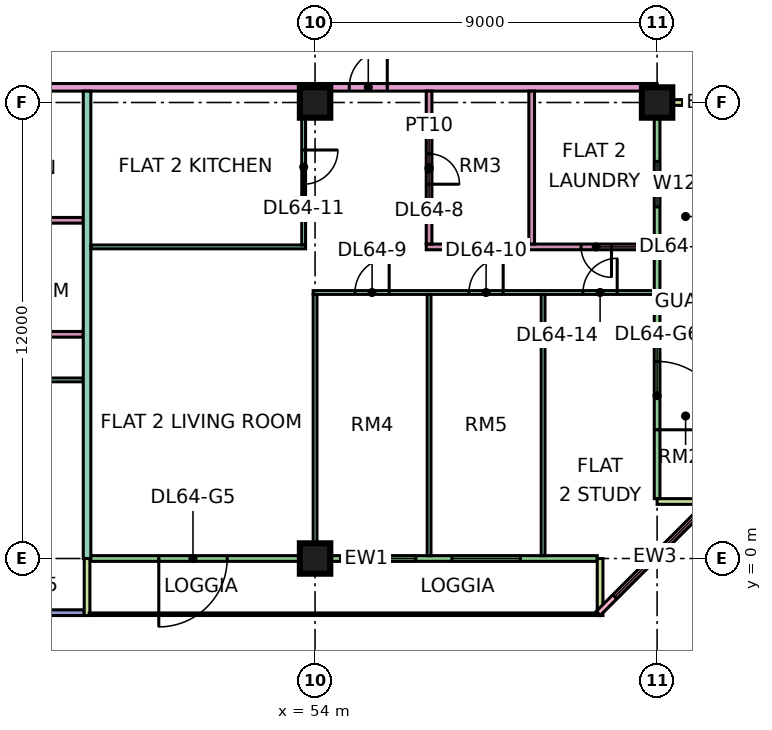
"""IFC4 building model, lengths in metres.
Left out: names, types, materials, properties, quantities, classifications, styles, units other than length and angle.
Written with IfcOpenShell. Run it as: python <this file> out.ifc"""

import sys

from ifc_helpers import new_model, si_unit, direction, frame, frame_2d, origin, origin_2d, place, context, subcontext, project, spatial, rectangle, extrude, element, fill, save


model = new_model("IFC4")
c1 = context("Model", 3, precision=1e-05, world=origin(), true_north=direction((0.0, 1.0)))
c2 = subcontext(c1, "Body", "Model", "MODEL_VIEW")
j1 = project(units=[si_unit("LENGTHUNIT", "METRE"), si_unit("PLANEANGLEUNIT", "RADIAN")], contexts=[c1])
p1 = place(None, origin())
s1 = spatial("IfcSite", under=j1, at=p1, CompositionType="ELEMENT")
p2 = place(p1, origin())
s2 = spatial("IfcBuilding", under=s1, at=p2, CompositionType="ELEMENT")
p3 = place(p2, frame((0.0, 0.0, 277.15)))
s3 = spatial("IfcBuildingStorey", under=s2, at=p3, CompositionType="ELEMENT", Elevation=277.15)
for number, where, z_axis, x_axis in (
    (1, (54.0, 0.0, 0.0), (0.0, 0.0, 1.0), (1.0, 0.0, 0.0)),
    (2, (54.0, 12.0, 0.0), (0.0, 0.0, 1.0), (1.0, 0.0, 0.0)),
    (3, (63.0, 12.0, 0.0), (0.0, 0.0, 1.0), (1.0, 0.0, 0.0)),
):
    element("IfcColumn", number, at=place(p3, frame(where, z_axis=z_axis, x_axis=x_axis)), inside=s3, PredefinedType="COLUMN", context=c2, shape_type="SweptSolid", body=[
        extrude(rectangle(XDim=0.8, YDim=0.8, at=origin_2d()), origin(), (0.0, 0.0, 1.0), 3.75),
    ])
p4 = place(p3, frame((36.075, -1.425, 0.0), z_axis=(0.0, 0.0, 1.0), x_axis=(1.0, 0.0, 0.0)))
e4 = element("IfcWall", 4, at=p4, inside=s3, PredefinedType="SOLIDWALL", context=c2, shape_type="SweptSolid", body=[
    extrude(rectangle(XDim=11.85, YDim=0.15, at=frame_2d((5.925, 0.0))), origin(), (0.0, 0.0, 1.0), 3.35),
])
p5 = place(p4, frame((0.562, 0.0, 0.45)))
e5 = element("IfcOpeningElement", 5, at=p5, cuts=e4, PredefinedType="OPENING", context=c2, shape_type="SweptSolid", body=[
    extrude(rectangle(XDim=1.8, YDim=2.4, at=frame_2d((0.9, 1.2))), frame((0.0, 0.085, 0.0), z_axis=(0.0, -1.0, 0.0), x_axis=(1.0, 0.0, 0.0)), (0.0, 0.0, 1.0), 0.17),
])
p6 = place(p4, frame((5.887, 0.0, 0.45)))
e6 = element("IfcOpeningElement", 6, at=p6, cuts=e4, PredefinedType="OPENING", context=c2, shape_type="SweptSolid", body=[
    extrude(rectangle(XDim=3.0, YDim=2.4, at=frame_2d((1.5, 1.2))), frame((0.0, 0.085, 0.0), z_axis=(0.0, -1.0, 0.0), x_axis=(1.0, 0.0, 0.0)), (0.0, 0.0, 1.0), 0.17),
])
p7 = place(p3, frame((48.075, 0.0, 0.0), z_axis=(0.0, 0.0, 1.0), x_axis=(1.0, 0.0, 0.0)))
e7 = element("IfcWall", 7, at=p7, inside=s3, PredefinedType="SOLIDWALL", context=c2, shape_type="SweptSolid", body=[
    extrude(rectangle(XDim=13.35, YDim=0.15, at=frame_2d((6.675, 0.0))), origin(), (0.0, 0.0, 1.0), 3.35),
])
p8 = place(p7, frame((1.812, 0.0, 0.0)))
e8 = element("IfcOpeningElement", 8, at=p8, cuts=e7, PredefinedType="OPENING", context=c2, shape_type="SweptSolid", body=[
    extrude(rectangle(XDim=1.8, YDim=2.4, at=frame_2d((0.9, 1.2))), frame((0.0, 0.085, 0.0), z_axis=(0.0, -1.0, 0.0), x_axis=(1.0, 0.0, 0.0)), (0.0, 0.0, 1.0), 0.17),
])
p9 = place(p7, frame((6.775, 0.0, 0.45)))
e9 = element("IfcOpeningElement", 9, at=p9, cuts=e7, PredefinedType="OPENING", context=c2, shape_type="SweptSolid", body=[
    extrude(rectangle(XDim=1.8, YDim=2.4, at=frame_2d((0.9, 1.2))), frame((0.0, 0.085, 0.0), z_axis=(0.0, -1.0, 0.0), x_axis=(1.0, 0.0, 0.0)), (0.0, 0.0, 1.0), 0.17),
])
p10 = place(p7, frame((9.525, 0.0, 0.45)))
e10 = element("IfcOpeningElement", 10, at=p10, cuts=e7, PredefinedType="OPENING", context=c2, shape_type="SweptSolid", body=[
    extrude(rectangle(XDim=1.8, YDim=2.4, at=frame_2d((0.9, 1.2))), frame((0.0, 0.085, 0.0), z_axis=(0.0, -1.0, 0.0), x_axis=(1.0, 0.0, 0.0)), (0.0, 0.0, 1.0), 0.17),
])
for number, where, z_axis, x_axis in (
    (11, (48.0, -1.5, 0.0), (0.0, 0.0, 1.0), (0.0, 1.0, 0.0)),
    (12, (61.5, -1.5, 0.0), (0.0, 0.0, 1.0), (0.0, 1.0, 0.0)),
):
    element("IfcWall", number, at=place(p3, frame(where, z_axis=z_axis, x_axis=x_axis)), inside=s3, PredefinedType="SOLIDWALL", context=c2, shape_type="SweptSolid", body=[
        extrude(rectangle(XDim=1.5, YDim=0.15, at=frame_2d((0.75, 0.0))), origin(), (0.0, 0.0, 1.0), 3.35),
    ])
p11 = place(p3, frame((61.447, -1.447, 0.0), z_axis=(0.0, 0.0, 1.0), x_axis=(0.707106781187, 0.707106781187, 0.0)))
e13 = element("IfcWall", 13, at=p11, inside=s3, PredefinedType="SOLIDWALL", context=c2, shape_type="SweptSolid", body=[
    extrude(rectangle(XDim=4.243, YDim=0.15, at=frame_2d((2.121, 0.0))), origin(), (0.0, 0.0, 1.0), 3.35),
])
p12 = place(p11, frame((0.621, 0.0, 0.45)))
e14 = element("IfcOpeningElement", 14, at=p12, cuts=e13, PredefinedType="OPENING", context=c2, shape_type="SweptSolid", body=[
    extrude(rectangle(XDim=3.0, YDim=2.4, at=frame_2d((1.5, 1.2))), frame((0.0, 0.085, 0.0), z_axis=(0.0, -1.0, 0.0), x_axis=(1.0, 0.0, 0.0)), (0.0, 0.0, 1.0), 0.17),
])
p13 = place(p3, frame((63.0, 1.575, 0.0), z_axis=(0.0, 0.0, 1.0), x_axis=(0.0, 1.0, 0.0)))
e15 = element("IfcWall", 15, at=p13, inside=s3, PredefinedType="SOLIDWALL", context=c2, shape_type="SweptSolid", body=[
    extrude(rectangle(XDim=10.35, YDim=0.15, at=frame_2d((5.175, 0.0))), origin(), (0.0, 0.0, 1.0), 3.35),
])
p14 = place(p13, frame((1.812, 0.0, 0.0)))
e16 = element("IfcOpeningElement", 16, at=p14, cuts=e15, PredefinedType="OPENING", context=c2, shape_type="SweptSolid", body=[
    extrude(rectangle(XDim=1.8, YDim=2.4, at=frame_2d((0.9, 1.2))), frame((0.0, 0.085, 0.0), z_axis=(0.0, -1.0, 0.0), x_axis=(1.0, 0.0, 0.0)), (0.0, 0.0, 1.0), 0.17),
])
p15 = place(p13, frame((7.675, 0.0, 1.7)))
e17 = element("IfcOpeningElement", 17, at=p15, cuts=e15, PredefinedType="OPENING", context=c2, shape_type="SweptSolid", body=[
    extrude(rectangle(XDim=1.2, YDim=0.9, at=frame_2d((0.6, 0.45))), frame((0.0, 0.085, 0.0), z_axis=(0.0, -1.0, 0.0), x_axis=(1.0, 0.0, 0.0)), (0.0, 0.0, 1.0), 0.17),
])
for number, where, z_axis, x_axis in (
    (18, (64.5, 1.5, 0.0), (0.0, 0.0, 1.0), (-1.0, 0.0, 0.0)),
    (19, (64.5, 12.0, 0.0), (0.0, 0.0, 1.0), (-1.0, 0.0, 0.0)),
):
    element("IfcWall", number, at=place(p3, frame(where, z_axis=z_axis, x_axis=x_axis)), inside=s3, PredefinedType="SOLIDWALL", context=c2, shape_type="SweptSolid", body=[
        extrude(rectangle(XDim=1.5, YDim=0.15, at=frame_2d((0.75, 0.0))), origin(), (0.0, 0.0, 1.0), 3.35),
    ])
p16 = place(p3, frame((33.05, 4.7, 0.0), z_axis=(0.0, 0.0, 1.0), x_axis=(1.0, 0.0, 0.0)))
e20 = element("IfcWall", 20, at=p16, inside=s3, PredefinedType="PARTITIONING", context=c2, shape_type="SweptSolid", body=[
    extrude(rectangle(XDim=14.85, YDim=0.1, at=frame_2d((7.425, 0.0))), origin(), (0.0, 0.0, 1.0), 3.35),
])
p17 = place(p16, frame((1.0, 0.0, 0.0)))
e21 = element("IfcOpeningElement", 21, at=p17, cuts=e20, PredefinedType="OPENING", context=c2, shape_type="SweptSolid", body=[
    extrude(rectangle(XDim=0.9, YDim=2.1, at=frame_2d((0.45, 1.05))), frame((0.0, 0.06, 0.0), z_axis=(0.0, -1.0, 0.0), x_axis=(1.0, 0.0, 0.0)), (0.0, 0.0, 1.0), 0.12),
])
p18 = place(p16, frame((4.0, 0.0, 0.0)))
e22 = element("IfcOpeningElement", 22, at=p18, cuts=e20, PredefinedType="OPENING", context=c2, shape_type="SweptSolid", body=[
    extrude(rectangle(XDim=0.9, YDim=2.1, at=frame_2d((0.45, 1.05))), frame((0.0, 0.06, 0.0), z_axis=(0.0, -1.0, 0.0), x_axis=(1.0, 0.0, 0.0)), (0.0, 0.0, 1.0), 0.12),
])
p19 = place(p16, frame((10.0, 0.0, 0.0)))
e23 = element("IfcOpeningElement", 23, at=p19, cuts=e20, PredefinedType="OPENING", context=c2, shape_type="SweptSolid", body=[
    extrude(rectangle(XDim=0.9, YDim=2.1, at=frame_2d((0.45, 1.05))), frame((0.0, 0.06, 0.0), z_axis=(0.0, -1.0, 0.0), x_axis=(1.0, 0.0, 0.0)), (0.0, 0.0, 1.0), 0.12),
])
p20 = place(p3, frame((40.65, 12.4, 0.0), z_axis=(0.0, 0.0, 1.0), x_axis=(1.0, 0.0, 0.0)))
e24 = element("IfcWall", 24, at=p20, inside=s3, PredefinedType="PARTITIONING", context=c2, shape_type="SweptSolid", body=[
    extrude(rectangle(XDim=22.35, YDim=0.2, at=frame_2d((11.175, 0.0))), origin(), (0.0, 0.0, 1.0), 3.35),
])
p21 = place(p20, frame((14.25, 0.0, 0.0)))
e25 = element("IfcOpeningElement", 25, at=p21, cuts=e24, PredefinedType="OPENING", context=c2, shape_type="SweptSolid", body=[
    extrude(rectangle(XDim=1.0, YDim=2.1, at=frame_2d((0.5, 1.05))), frame((0.0, 0.11, 0.0), z_axis=(0.0, -1.0, 0.0), x_axis=(1.0, 0.0, 0.0)), (0.0, 0.0, 1.0), 0.22),
])
p22 = place(p20, frame((1.05, 0.0, 0.0)))
e26 = element("IfcOpeningElement", 26, at=p22, cuts=e24, PredefinedType="OPENING", context=c2, shape_type="SweptSolid", body=[
    extrude(rectangle(XDim=1.0, YDim=2.1, at=frame_2d((0.5, 1.05))), frame((0.0, 0.11, 0.0), z_axis=(0.0, -1.0, 0.0), x_axis=(1.0, 0.0, 0.0)), (0.0, 0.0, 1.0), 0.22),
])
p23 = place(p3, frame((43.725, 5.9, 0.0), z_axis=(0.0, 0.0, 1.0), x_axis=(1.0, 0.0, 0.0)))
e27 = element("IfcWall", 27, at=p23, inside=s3, PredefinedType="PARTITIONING", context=c2, shape_type="SweptSolid", body=[
    extrude(rectangle(XDim=4.175, YDim=0.15, at=frame_2d((2.087, 0.0))), origin(), (0.0, 0.0, 1.0), 3.35),
])
p24 = place(p23, frame((1.675, 0.0, 0.0)))
e28 = element("IfcOpeningElement", 28, at=p24, cuts=e27, PredefinedType="OPENING", context=c2, shape_type="SweptSolid", body=[
    extrude(rectangle(XDim=0.8, YDim=2.1, at=frame_2d((0.4, 1.05))), frame((0.0, 0.085, 0.0), z_axis=(0.0, -1.0, 0.0), x_axis=(1.0, 0.0, 0.0)), (0.0, 0.0, 1.0), 0.17),
])
p25 = place(p3, frame((43.725, 8.9, 0.0), z_axis=(0.0, 0.0, 1.0), x_axis=(1.0, 0.0, 0.0)))
e29 = element("IfcWall", 29, at=p25, inside=s3, PredefinedType="PARTITIONING", context=c2, shape_type="SweptSolid", body=[
    extrude(rectangle(XDim=4.175, YDim=0.15, at=frame_2d((2.087, 0.0))), origin(), (0.0, 0.0, 1.0), 3.35),
])
p26 = place(p3, frame((48.0, 0.0, 0.0), z_axis=(0.0, 0.0, 1.0), x_axis=(0.0, 1.0, 0.0)))
e30 = element("IfcWall", 30, at=p26, inside=s3, PredefinedType="PARTITIONING", context=c2, shape_type="SweptSolid", body=[
    extrude(rectangle(XDim=12.3, YDim=0.2, at=frame_2d((6.15, 0.0))), origin(), (0.0, 0.0, 1.0), 3.35),
])
p27 = place(p3, frame((48.1, 8.2, 0.0), z_axis=(0.0, 0.0, 1.0), x_axis=(1.0, 0.0, 0.0)))
e31 = element("IfcWall", 31, at=p27, inside=s3, PredefinedType="PARTITIONING", context=c2, shape_type="SweptSolid", body=[
    extrude(rectangle(XDim=5.65, YDim=0.1, at=frame_2d((2.825, 0.0))), origin(), (0.0, 0.0, 1.0), 3.35),
])
p28 = place(p3, frame((53.7, 8.25, 0.0), z_axis=(0.0, 0.0, 1.0), x_axis=(0.0, 1.0, 0.0)))
e32 = element("IfcWall", 32, at=p28, inside=s3, PredefinedType="PARTITIONING", context=c2, shape_type="SweptSolid", body=[
    extrude(rectangle(XDim=4.05, YDim=0.1, at=frame_2d((2.025, 0.0))), origin(), (0.0, 0.0, 1.0), 3.35),
])
p29 = place(p28, frame((1.6, 0.0, 0.0)))
e33 = element("IfcOpeningElement", 33, at=p29, cuts=e32, PredefinedType="OPENING", context=c2, shape_type="SweptSolid", body=[
    extrude(rectangle(XDim=0.9, YDim=2.1, at=frame_2d((0.45, 1.05))), frame((0.0, 0.06, 0.0), z_axis=(0.0, -1.0, 0.0), x_axis=(1.0, 0.0, 0.0)), (0.0, 0.0, 1.0), 0.12),
])
p30 = place(p3, frame((53.95, 7.0, 0.0), z_axis=(0.0, 0.0, 1.0), x_axis=(1.0, 0.0, 0.0)))
e34 = element("IfcWall", 34, at=p30, inside=s3, PredefinedType="PARTITIONING", context=c2, shape_type="SweptSolid", body=[
    extrude(rectangle(XDim=8.976, YDim=0.1, at=frame_2d((4.488, 0.0))), origin(), (0.0, 0.0, 1.0), 3.35),
])
p31 = place(p30, frame((1.1, 0.0, 0.0)))
e35 = element("IfcOpeningElement", 35, at=p31, cuts=e34, PredefinedType="OPENING", context=c2, shape_type="SweptSolid", body=[
    extrude(rectangle(XDim=0.9, YDim=2.1, at=frame_2d((0.45, 1.05))), frame((0.0, 0.06, 0.0), z_axis=(0.0, -1.0, 0.0), x_axis=(1.0, 0.0, 0.0)), (0.0, 0.0, 1.0), 0.12),
])
p32 = place(p30, frame((4.1, 0.0, 0.0)))
e36 = element("IfcOpeningElement", 36, at=p32, cuts=e34, PredefinedType="OPENING", context=c2, shape_type="SweptSolid", body=[
    extrude(rectangle(XDim=0.9, YDim=2.1, at=frame_2d((0.45, 1.05))), frame((0.0, 0.06, 0.0), z_axis=(0.0, -1.0, 0.0), x_axis=(1.0, 0.0, 0.0)), (0.0, 0.0, 1.0), 0.12),
])
p33 = place(p30, frame((7.1, 0.0, 0.0)))
e37 = element("IfcOpeningElement", 37, at=p33, cuts=e34, PredefinedType="OPENING", context=c2, shape_type="SweptSolid", body=[
    extrude(rectangle(XDim=0.9, YDim=2.1, at=frame_2d((0.45, 1.05))), frame((0.0, 0.06, 0.0), z_axis=(0.0, -1.0, 0.0), x_axis=(1.0, 0.0, 0.0)), (0.0, 0.0, 1.0), 0.12),
])
p34 = place(p3, frame((54.0, 0.074, 0.0), z_axis=(0.0, 0.0, 1.0), x_axis=(0.0, 1.0, 0.0)))
e38 = element("IfcWall", 38, at=p34, inside=s3, PredefinedType="PARTITIONING", context=c2, shape_type="SweptSolid", body=[
    extrude(rectangle(XDim=6.876, YDim=0.1, at=frame_2d((3.438, 0.0))), origin(), (0.0, 0.0, 1.0), 3.35),
])
p35 = place(p3, frame((56.925, 8.2, 0.0), z_axis=(0.0, 0.0, 1.0), x_axis=(1.0, 0.0, 0.0)))
e39 = element("IfcWall", 39, at=p35, inside=s3, PredefinedType="PARTITIONING", context=c2, shape_type="SweptSolid", body=[
    extrude(rectangle(XDim=6.001, YDim=0.15, at=frame_2d((3.0, 0.0))), origin(), (0.0, 0.0, 1.0), 3.35),
])
p36 = place(p35, frame((4.075, 0.0, 0.0)))
e40 = element("IfcOpeningElement", 40, at=p36, cuts=e39, PredefinedType="OPENING", context=c2, shape_type="SweptSolid", body=[
    extrude(rectangle(XDim=0.8, YDim=2.1, at=frame_2d((0.4, 1.05))), frame((0.0, 0.085, 0.0), z_axis=(0.0, -1.0, 0.0), x_axis=(1.0, 0.0, 0.0)), (0.0, 0.0, 1.0), 0.17),
])
p37 = place(p3, frame((57.0, 0.074, 0.0), z_axis=(0.0, 0.0, 1.0), x_axis=(0.0, 1.0, 0.0)))
e41 = element("IfcWall", 41, at=p37, inside=s3, PredefinedType="PARTITIONING", context=c2, shape_type="SweptSolid", body=[
    extrude(rectangle(XDim=6.876, YDim=0.1, at=frame_2d((3.438, 0.0))), origin(), (0.0, 0.0, 1.0), 3.35),
])
p38 = place(p3, frame((57.0, 8.275, 0.0), z_axis=(0.0, 0.0, 1.0), x_axis=(0.0, 1.0, 0.0)))
e42 = element("IfcWall", 42, at=p38, inside=s3, PredefinedType="PARTITIONING", context=c2, shape_type="SweptSolid", body=[
    extrude(rectangle(XDim=4.025, YDim=0.15, at=frame_2d((2.013, 0.0))), origin(), (0.0, 0.0, 1.0), 3.35),
])
p39 = place(p38, frame((1.575, 0.0, 0.0)))
e43 = element("IfcOpeningElement", 43, at=p39, cuts=e42, PredefinedType="OPENING", context=c2, shape_type="SweptSolid", body=[
    extrude(rectangle(XDim=0.8, YDim=2.1, at=frame_2d((0.4, 1.05))), frame((0.0, 0.085, 0.0), z_axis=(0.0, -1.0, 0.0), x_axis=(1.0, 0.0, 0.0)), (0.0, 0.0, 1.0), 0.17),
])
p40 = place(p3, frame((59.7, 8.275, 0.0), z_axis=(0.0, 0.0, 1.0), x_axis=(0.0, 1.0, 0.0)))
e44 = element("IfcWall", 44, at=p40, inside=s3, PredefinedType="PARTITIONING", context=c2, shape_type="SweptSolid", body=[
    extrude(rectangle(XDim=4.025, YDim=0.15, at=frame_2d((2.013, 0.0))), origin(), (0.0, 0.0, 1.0), 3.35),
])
p41 = place(p3, frame((60.0, 0.074, 0.0), z_axis=(0.0, 0.0, 1.0), x_axis=(0.0, 1.0, 0.0)))
e45 = element("IfcWall", 45, at=p41, inside=s3, PredefinedType="PARTITIONING", context=c2, shape_type="SweptSolid", body=[
    extrude(rectangle(XDim=6.876, YDim=0.1, at=frame_2d((3.438, 0.0))), origin(), (0.0, 0.0, 1.0), 3.35),
])
p42 = place(p8, frame((1.8, 0.0, 0.0), z_axis=(0.0, 0.0, 1.0), x_axis=(-1.0, 0.0, 0.0)))
e46 = element("IfcDoor", 46, at=p42, inside=s3, OperationType="DOUBLE_DOOR_SINGLE_SWING", PredefinedType="DOOR", context=c2, shape_type="SweptSolid", body=[
    extrude(rectangle(XDim=1.8, YDim=2.4, at=frame_2d((0.9, 1.2))), frame((0.0, 0.025, 0.0), z_axis=(0.0, -1.0, 0.0), x_axis=(1.0, 0.0, 0.0)), (0.0, 0.0, 1.0), 0.05),
])
fill(e8, e46)
p43 = place(p9, origin())
e47 = element("IfcWindow", 47, at=p43, inside=s3, PartitioningType="SINGLE_PANEL", PredefinedType="WINDOW", context=c2, shape_type="SweptSolid", body=[
    extrude(rectangle(XDim=1.8, YDim=2.4, at=frame_2d((0.9, 1.2))), frame((0.0, 0.03, 0.0), z_axis=(0.0, -1.0, 0.0), x_axis=(1.0, 0.0, 0.0)), (0.0, 0.0, 1.0), 0.06),
])
fill(e9, e47)
p44 = place(p10, origin())
e48 = element("IfcWindow", 48, at=p44, inside=s3, PartitioningType="SINGLE_PANEL", PredefinedType="WINDOW", context=c2, shape_type="SweptSolid", body=[
    extrude(rectangle(XDim=1.8, YDim=2.4, at=frame_2d((0.9, 1.2))), frame((0.0, 0.03, 0.0), z_axis=(0.0, -1.0, 0.0), x_axis=(1.0, 0.0, 0.0)), (0.0, 0.0, 1.0), 0.06),
])
fill(e10, e48)
p45 = place(p12, origin())
e49 = element("IfcWindow", 49, at=p45, inside=s3, PartitioningType="SINGLE_PANEL", PredefinedType="WINDOW", context=c2, shape_type="SweptSolid", body=[
    extrude(rectangle(XDim=3.0, YDim=2.4, at=frame_2d((1.5, 1.2))), frame((0.0, 0.03, 0.0), z_axis=(0.0, -1.0, 0.0), x_axis=(1.0, 0.0, 0.0)), (0.0, 0.0, 1.0), 0.06),
])
fill(e14, e49)
p46 = place(p14, frame((1.8, 0.0, 0.0), z_axis=(0.0, 0.0, 1.0), x_axis=(-1.0, 0.0, 0.0)))
e50 = element("IfcDoor", 50, at=p46, inside=s3, OperationType="DOUBLE_DOOR_SINGLE_SWING", PredefinedType="DOOR", context=c2, shape_type="SweptSolid", body=[
    extrude(rectangle(XDim=1.8, YDim=2.4, at=frame_2d((0.9, 1.2))), frame((0.0, 0.025, 0.0), z_axis=(0.0, -1.0, 0.0), x_axis=(1.0, 0.0, 0.0)), (0.0, 0.0, 1.0), 0.05),
])
fill(e16, e50)
p47 = place(p15, origin())
e51 = element("IfcWindow", 51, at=p47, inside=s3, PartitioningType="SINGLE_PANEL", PredefinedType="WINDOW", context=c2, shape_type="SweptSolid", body=[
    extrude(rectangle(XDim=1.2, YDim=0.9, at=frame_2d((0.6, 0.45))), frame((0.0, 0.03, 0.0), z_axis=(0.0, -1.0, 0.0), x_axis=(1.0, 0.0, 0.0)), (0.0, 0.0, 1.0), 0.06),
])
fill(e17, e51)
p48 = place(p39, frame((0.8, 0.0, 0.0), z_axis=(0.0, 0.0, 1.0), x_axis=(-1.0, 0.0, 0.0)))
e52 = element("IfcDoor", 52, at=p48, inside=s3, OperationType="SINGLE_SWING_LEFT", PredefinedType="DOOR", context=c2, shape_type="SweptSolid", body=[
    extrude(rectangle(XDim=0.8, YDim=2.1, at=frame_2d((0.4, 1.05))), frame((0.0, 0.025, 0.0), z_axis=(0.0, -1.0, 0.0), x_axis=(1.0, 0.0, 0.0)), (0.0, 0.0, 1.0), 0.05),
])
fill(e43, e52)
p49 = place(p31, frame((0.9, 0.0, 0.0), z_axis=(0.0, 0.0, 1.0), x_axis=(-1.0, 0.0, 0.0)))
e53 = element("IfcDoor", 53, at=p49, inside=s3, OperationType="SINGLE_SWING_RIGHT", PredefinedType="DOOR", context=c2, shape_type="SweptSolid", body=[
    extrude(rectangle(XDim=0.9, YDim=2.1, at=frame_2d((0.45, 1.05))), frame((0.0, 0.025, 0.0), z_axis=(0.0, -1.0, 0.0), x_axis=(1.0, 0.0, 0.0)), (0.0, 0.0, 1.0), 0.05),
])
fill(e35, e53)
p50 = place(p32, frame((0.9, 0.0, 0.0), z_axis=(0.0, 0.0, 1.0), x_axis=(-1.0, 0.0, 0.0)))
e54 = element("IfcDoor", 54, at=p50, inside=s3, OperationType="SINGLE_SWING_RIGHT", PredefinedType="DOOR", context=c2, shape_type="SweptSolid", body=[
    extrude(rectangle(XDim=0.9, YDim=2.1, at=frame_2d((0.45, 1.05))), frame((0.0, 0.025, 0.0), z_axis=(0.0, -1.0, 0.0), x_axis=(1.0, 0.0, 0.0)), (0.0, 0.0, 1.0), 0.05),
])
fill(e36, e54)
p51 = place(p29, origin())
e55 = element("IfcDoor", 55, at=p51, inside=s3, OperationType="SINGLE_SWING_RIGHT", PredefinedType="DOOR", context=c2, shape_type="SweptSolid", body=[
    extrude(rectangle(XDim=0.9, YDim=2.1, at=frame_2d((0.45, 1.05))), frame((0.0, 0.025, 0.0), z_axis=(0.0, -1.0, 0.0), x_axis=(1.0, 0.0, 0.0)), (0.0, 0.0, 1.0), 0.05),
])
fill(e33, e55)
p52 = place(p36, origin())
e56 = element("IfcDoor", 56, at=p52, inside=s3, OperationType="SINGLE_SWING_RIGHT", PredefinedType="DOOR", context=c2, shape_type="SweptSolid", body=[
    extrude(rectangle(XDim=0.8, YDim=2.1, at=frame_2d((0.4, 1.05))), frame((0.0, 0.025, 0.0), z_axis=(0.0, -1.0, 0.0), x_axis=(1.0, 0.0, 0.0)), (0.0, 0.0, 1.0), 0.05),
])
fill(e40, e56)
p53 = place(p21, frame((1.0, 0.0, 0.0), z_axis=(0.0, 0.0, 1.0), x_axis=(-1.0, 0.0, 0.0)))
e57 = element("IfcDoor", 57, at=p53, inside=s3, OperationType="SINGLE_SWING_RIGHT", PredefinedType="DOOR", context=c2, shape_type="SweptSolid", body=[
    extrude(rectangle(XDim=1.0, YDim=2.1, at=frame_2d((0.5, 1.05))), frame((0.0, 0.025, 0.0), z_axis=(0.0, -1.0, 0.0), x_axis=(1.0, 0.0, 0.0)), (0.0, 0.0, 1.0), 0.05),
])
fill(e25, e57)
p54 = place(p33, frame((0.9, 0.0, 0.0), z_axis=(0.0, 0.0, 1.0), x_axis=(-1.0, 0.0, 0.0)))
e58 = element("IfcDoor", 58, at=p54, inside=s3, OperationType="SINGLE_SWING_RIGHT", PredefinedType="DOOR", context=c2, shape_type="SweptSolid", body=[
    extrude(rectangle(XDim=0.9, YDim=2.1, at=frame_2d((0.45, 1.05))), frame((0.0, 0.025, 0.0), z_axis=(0.0, -1.0, 0.0), x_axis=(1.0, 0.0, 0.0)), (0.0, 0.0, 1.0), 0.05),
])
fill(e37, e58)
save(model, sys.argv[1])
